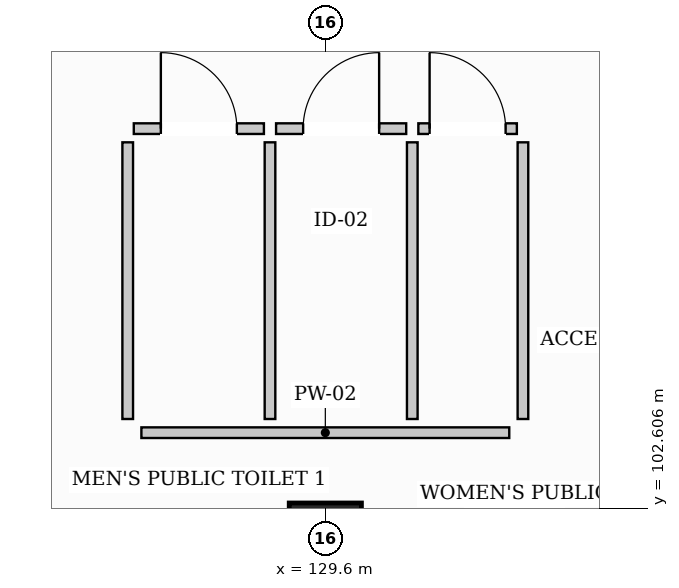
"""IFC4 building model, lengths in metres.
Left out: names, types, materials, properties, quantities, classifications, styles, units other than length and angle.
Written with IfcOpenShell. Run it as: python <this file> out.ifc"""

import sys

from ifc_helpers import new_model, si_unit, direction, frame, frame_2d, origin, origin_2d, place, context, subcontext, project, spatial, rectangle, extrude, element, fill, save


model = new_model("IFC4")
c1 = context("Model", 3, precision=1e-05, world=origin(), true_north=direction((0.0, 1.0)))
c2 = subcontext(c1, "Body", "Model", "MODEL_VIEW")
j1 = project(units=[si_unit("LENGTHUNIT", "METRE"), si_unit("PLANEANGLEUNIT", "RADIAN")], contexts=[c1])
p1 = place(None, origin())
s1 = spatial("IfcSite", under=j1, at=p1, CompositionType="ELEMENT")
p2 = place(p1, origin())
s2 = spatial("IfcBuilding", under=s1, at=p2, CompositionType="ELEMENT")
p3 = place(p2, frame((0.0, 0.0, -4.2)))
s3 = spatial("IfcBuildingStorey", under=s2, at=p3, CompositionType="ELEMENT", Elevation=-4.2)
p4 = place(p3, frame((129.6, 102.2, 0.0), z_axis=(0.0, 0.0, 1.0), x_axis=(1.0, 0.0, 0.0)))
e1 = element("IfcColumn", 1, at=p4, inside=s3, PredefinedType="COLUMN", context=c2, shape_type="SweptSolid", body=[
    extrude(rectangle(XDim=0.95, YDim=0.95, at=origin_2d()), origin(), (0.0, 0.0, 1.0), 4.2),
])
p5 = place(p3, frame((127.18, 103.6, 0.0), z_axis=(0.0, 0.0, 1.0), x_axis=(1.0, 0.0, 0.0)))
e2 = element("IfcWall", 2, at=p5, inside=s3, PredefinedType="PARTITIONING", context=c2, shape_type="SweptSolid", body=[
    extrude(rectangle(XDim=4.84, YDim=0.14, at=frame_2d((2.42, 0.0))), origin(), (0.0, 0.0, 1.0), 3.39),
])
for number, where, z_axis, x_axis in (
    (3, (127.0, 103.78, 0.0), (0.0, 0.0, 1.0), (0.0, 1.0, 0.0)),
    (4, (132.2, 103.78, 0.0), (0.0, 0.0, 1.0), (0.0, 1.0, 0.0)),
    (5, (128.872, 103.78, 0.0), (0.0, 0.0, 1.0), (0.0, 1.0, 0.0)),
    (6, (130.744, 103.78, 0.0), (0.0, 0.0, 1.0), (0.0, 1.0, 0.0)),
):
    element("IfcWall", number, at=place(p3, frame(where, z_axis=z_axis, x_axis=x_axis)), inside=s3, PredefinedType="PARTITIONING", context=c2, shape_type="SweptSolid", body=[
        extrude(rectangle(XDim=3.64, YDim=0.14, at=frame_2d((1.82, 0.0))), origin(), (0.0, 0.0, 1.0), 3.84),
    ])
p6 = place(p3, frame((127.08, 107.6, 0.0), z_axis=(0.0, 0.0, 1.0), x_axis=(1.0, 0.0, 0.0)))
e7 = element("IfcWall", 7, at=p6, inside=s3, PredefinedType="PARTITIONING", context=c2, shape_type="SweptSolid", body=[
    extrude(rectangle(XDim=1.712, YDim=0.14, at=frame_2d((0.856, 0.0))), origin(), (0.0, 0.0, 1.0), 3.84),
])
p7 = place(p6, frame((0.356, 0.0, 0.0)))
e8 = element("IfcOpeningElement", 8, at=p7, cuts=e7, PredefinedType="OPENING", context=c2, shape_type="SweptSolid", body=[
    extrude(rectangle(XDim=1.0, YDim=2.15, at=frame_2d((0.5, 1.075))), frame((0.0, 0.08, 0.0), z_axis=(0.0, -1.0, 0.0), x_axis=(1.0, 0.0, 0.0)), (0.0, 0.0, 1.0), 0.16),
])
p8 = place(p3, frame((128.952, 107.6, 0.0), z_axis=(0.0, 0.0, 1.0), x_axis=(1.0, 0.0, 0.0)))
e9 = element("IfcWall", 9, at=p8, inside=s3, PredefinedType="PARTITIONING", context=c2, shape_type="SweptSolid", body=[
    extrude(rectangle(XDim=1.712, YDim=0.14, at=frame_2d((0.856, 0.0))), origin(), (0.0, 0.0, 1.0), 3.39),
])
p9 = place(p8, frame((0.356, 0.0, 0.0)))
e10 = element("IfcOpeningElement", 10, at=p9, cuts=e9, PredefinedType="OPENING", context=c2, shape_type="SweptSolid", body=[
    extrude(rectangle(XDim=1.0, YDim=2.15, at=frame_2d((0.5, 1.075))), frame((0.0, 0.08, 0.0), z_axis=(0.0, -1.0, 0.0), x_axis=(1.0, 0.0, 0.0)), (0.0, 0.0, 1.0), 0.16),
])
p10 = place(p3, frame((130.824, 107.6, 0.0), z_axis=(0.0, 0.0, 1.0), x_axis=(1.0, 0.0, 0.0)))
e11 = element("IfcWall", 11, at=p10, inside=s3, PredefinedType="PARTITIONING", context=c2, shape_type="SweptSolid", body=[
    extrude(rectangle(XDim=1.296, YDim=0.14, at=frame_2d((0.648, 0.0))), origin(), (0.0, 0.0, 1.0), 3.84),
])
p11 = place(p10, frame((0.148, 0.0, 0.0)))
e12 = element("IfcOpeningElement", 12, at=p11, cuts=e11, PredefinedType="OPENING", context=c2, shape_type="SweptSolid", body=[
    extrude(rectangle(XDim=1.0, YDim=2.15, at=frame_2d((0.5, 1.075))), frame((0.0, 0.08, 0.0), z_axis=(0.0, -1.0, 0.0), x_axis=(1.0, 0.0, 0.0)), (0.0, 0.0, 1.0), 0.16),
])
p12 = place(p7, origin())
e13 = element("IfcDoor", 13, at=p12, inside=s3, OperationType="SINGLE_SWING_LEFT", PredefinedType="DOOR", context=c2, shape_type="SweptSolid", body=[
    extrude(rectangle(XDim=1.0, YDim=2.15, at=frame_2d((0.5, 1.075))), frame((0.0, 0.025, 0.0), z_axis=(0.0, -1.0, 0.0), x_axis=(1.0, 0.0, 0.0)), (0.0, 0.0, 1.0), 0.05),
])
fill(e8, e13)
p13 = place(p9, origin())
e14 = element("IfcDoor", 14, at=p13, inside=s3, OperationType="SINGLE_SWING_RIGHT", PredefinedType="DOOR", context=c2, shape_type="SweptSolid", body=[
    extrude(rectangle(XDim=1.0, YDim=2.15, at=frame_2d((0.5, 1.075))), frame((0.0, 0.025, 0.0), z_axis=(0.0, -1.0, 0.0), x_axis=(1.0, 0.0, 0.0)), (0.0, 0.0, 1.0), 0.05),
])
fill(e10, e14)
p14 = place(p11, origin())
e15 = element("IfcDoor", 15, at=p14, inside=s3, OperationType="SINGLE_SWING_LEFT", PredefinedType="DOOR", context=c2, shape_type="SweptSolid", body=[
    extrude(rectangle(XDim=1.0, YDim=2.15, at=frame_2d((0.5, 1.075))), frame((0.0, 0.025, 0.0), z_axis=(0.0, -1.0, 0.0), x_axis=(1.0, 0.0, 0.0)), (0.0, 0.0, 1.0), 0.05),
])
fill(e12, e15)
save(model, sys.argv[1])
